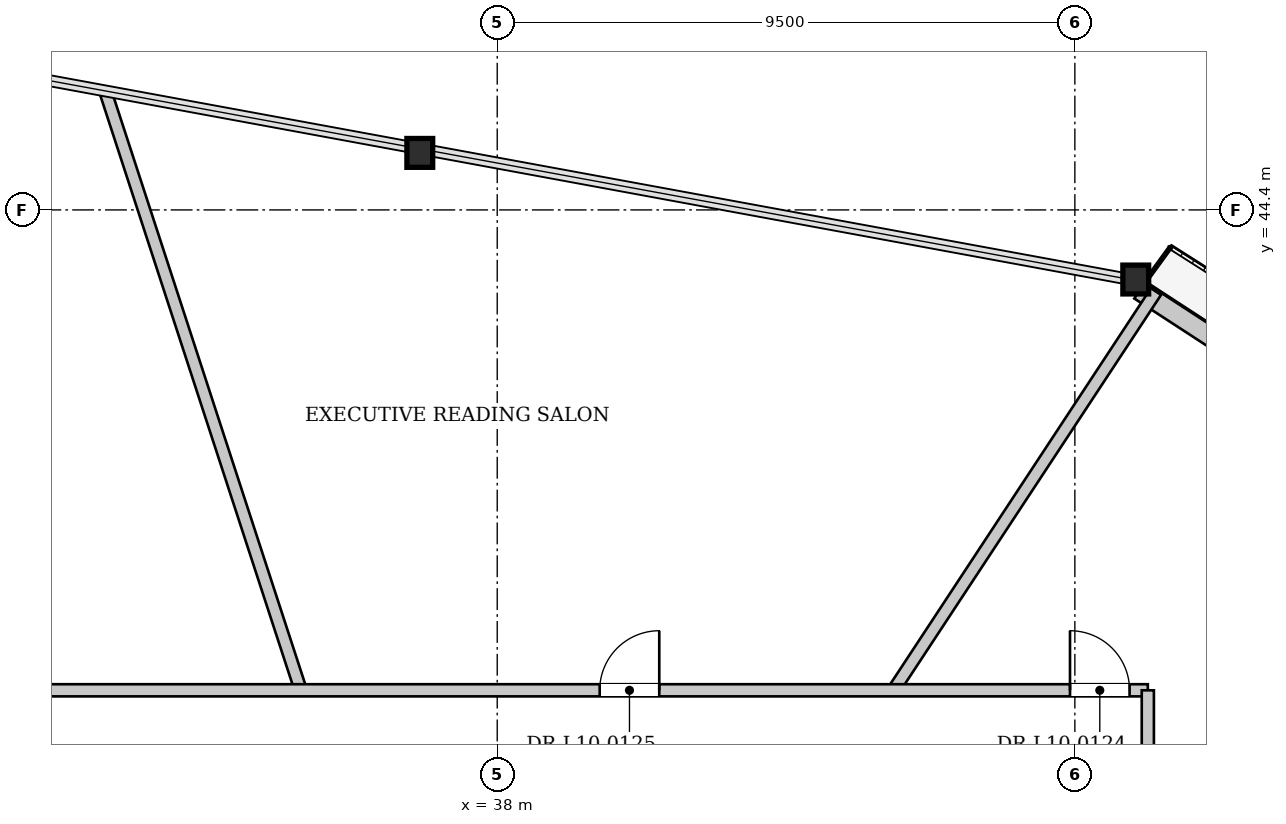
"""IFC4 building model, lengths in metres.
Left out: names, types, materials, properties, quantities, classifications, styles, units other than length and angle.
Written with IfcOpenShell. Run it as: python <this file> out.ifc"""

import sys

from ifc_helpers import new_model, si_unit, direction, frame, frame_2d, origin, origin_2d, place, context, subcontext, project, spatial, rectangle, i_section, extrude, source, transform, mapped, element, fill, save


model = new_model("IFC4")
c1 = context("Model", 3, precision=1e-05, world=origin(), true_north=direction((0.0, 1.0)))
c2 = subcontext(c1, "Body", "Model", "MODEL_VIEW")
j1 = project(units=[si_unit("LENGTHUNIT", "METRE"), si_unit("PLANEANGLEUNIT", "RADIAN")], contexts=[c1])
p1 = place(None, origin())
s1 = spatial("IfcSite", under=j1, at=p1, CompositionType="ELEMENT")
p2 = place(p1, origin())
s2 = spatial("IfcBuilding", under=s1, at=p2, CompositionType="ELEMENT")
p3 = place(p2, frame((0.0, 0.0, 43.5)))
s3 = spatial("IfcBuildingStorey", under=s2, at=p3, CompositionType="ELEMENT", Elevation=43.5)
m1 = source(origin(), c2, "Body", "SweptSolid", [
    extrude(i_section(OverallWidth=0.424, OverallDepth=0.474, WebThickness=0.043, FlangeThickness=0.068, at=origin_2d()), origin(), (0.0, 0.0, 1.0), 3.399),
])
p4 = place(p3, frame((48.652, 43.211, 0.0), z_axis=(-0.088620867342, 0.025925553574, 0.995727978689), x_axis=(-0.280776438027, -0.95977319813, 0.0)))
e1 = element("IfcColumn", 1, at=p4, inside=s3, PredefinedType="COLUMN", context=c2, shape_type="MappedRepresentation", body=[
    mapped(m1, transform((0.0, 0.0, 0.0), x_axis=(1.0, 0.0, 0.0), y_axis=(0.0, 1.0, 0.0), z_axis=(0.0, 0.0, 1.0), scale=1.0)),
])
m2 = source(origin(), c2, "Body", "SweptSolid", [
    extrude(i_section(OverallWidth=0.424, OverallDepth=0.474, WebThickness=0.043, FlangeThickness=0.068, at=origin_2d()), origin(), (0.0, 0.0, 1.0), 3.4),
])
p5 = place(p3, frame((36.884, 45.377, 0.0), z_axis=(-0.092330898884, -0.022903232305, 0.995464940147), x_axis=(0.24075937965, -0.970584834577, 0.0)))
e2 = element("IfcColumn", 2, at=p5, inside=s3, PredefinedType="COLUMN", context=c2, shape_type="MappedRepresentation", body=[
    mapped(m2, transform((0.0, 0.0, 0.0), x_axis=(1.0, 0.0, 0.0), y_axis=(0.0, 1.0, 0.0), z_axis=(0.0, 0.0, 1.0), scale=1.0)),
])
p6 = place(p3, frame((48.565, 43.077, 0.0), z_axis=(0.0, 0.0, 1.0), x_axis=(0.838026180403, -0.545630022048, 0.0)))
e3 = element("IfcWall", 3, at=p6, inside=s3, PredefinedType="SOLIDWALL", context=c2, shape_type="SweptSolid", body=[
    extrude(rectangle(XDim=23.933, YDim=0.32, at=frame_2d((11.966, 0.0))), origin(), (0.0, 0.0, 1.0), 2.592),
])
p7 = place(p6, frame((7.108, 0.0, 0.0)))
e4 = element("IfcOpeningElement", 4, at=p7, cuts=e3, PredefinedType="OPENING", context=c2, shape_type="SweptSolid", body=[
    extrude(rectangle(XDim=1.1, YDim=2.3, at=frame_2d((0.55, 1.15))), frame((0.0, 0.17, 0.0), z_axis=(0.0, -1.0, 0.0), x_axis=(1.0, 0.0, 0.0)), (0.0, 0.0, 1.0), 0.34),
])
p8 = place(p6, frame((16.81, 0.0, 0.272)))
e5 = element("IfcOpeningElement", 5, at=p8, cuts=e3, PredefinedType="OPENING", context=c2, shape_type="SweptSolid", body=[
    extrude(rectangle(XDim=1.8, YDim=2.2, at=frame_2d((0.9, 1.1))), frame((0.0, 0.17, 0.0), z_axis=(0.0, -1.0, 0.0), x_axis=(1.0, 0.0, 0.0)), (0.0, 0.0, 1.0), 0.34),
])
p9 = place(p3, frame((44.517, 36.5, 0.0), z_axis=(0.0, 0.0, 1.0), x_axis=(0.549868353799, 0.835251335521, 0.0)))
e6 = element("IfcWall", 6, at=p9, inside=s3, PredefinedType="PARTITIONING", context=c2, shape_type="SweptSolid", body=[
    extrude(rectangle(XDim=7.851, YDim=0.2, at=frame_2d((3.925, 0.0))), origin(), (0.0, 0.0, 1.0), 3.3),
])
p10 = place(p3, frame((34.77, 36.5, 0.0), z_axis=(0.0, 0.0, 1.0), x_axis=(-0.310204417854, 0.950669879161, 0.0)))
e7 = element("IfcWall", 7, at=p10, inside=s3, PredefinedType="PARTITIONING", context=c2, shape_type="SweptSolid", body=[
    extrude(rectangle(XDim=10.334, YDim=0.2, at=frame_2d((5.167, 0.0))), origin(), (0.0, 0.0, 1.0), 3.3),
])
p11 = place(p3, frame((27.3, 36.5, 0.0), z_axis=(0.0, 0.0, 1.0), x_axis=(1.0, 0.0, 0.0)))
e8 = element("IfcWall", 8, at=p11, inside=s3, PredefinedType="PARTITIONING", context=c2, shape_type="SweptSolid", body=[
    extrude(rectangle(XDim=21.4, YDim=0.2, at=frame_2d((10.7, 0.0))), origin(), (0.0, 0.0, 1.0), 3.3),
])
p12 = place(p11, frame((20.12, 0.0, 0.0)))
e9 = element("IfcOpeningElement", 9, at=p12, cuts=e8, PredefinedType="OPENING", context=c2, shape_type="SweptSolid", body=[
    extrude(rectangle(XDim=0.98, YDim=2.15, at=frame_2d((0.49, 1.075))), frame((0.0, 0.11, 0.0), z_axis=(0.0, -1.0, 0.0), x_axis=(1.0, 0.0, 0.0)), (0.0, 0.0, 1.0), 0.22),
])
p13 = place(p11, frame((12.385, 0.0, 0.0)))
e10 = element("IfcOpeningElement", 10, at=p13, cuts=e8, PredefinedType="OPENING", context=c2, shape_type="SweptSolid", body=[
    extrude(rectangle(XDim=0.98, YDim=2.15, at=frame_2d((0.49, 1.075))), frame((0.0, 0.11, 0.0), z_axis=(0.0, -1.0, 0.0), x_axis=(1.0, 0.0, 0.0)), (0.0, 0.0, 1.0), 0.22),
])
p14 = place(p3, frame((48.7, 16.7, 0.0), z_axis=(0.0, 0.0, 1.0), x_axis=(0.0, 1.0, 0.0)))
e11 = element("IfcWall", 11, at=p14, inside=s3, PredefinedType="PARTITIONING", context=c2, shape_type="SweptSolid", body=[
    extrude(rectangle(XDim=19.8, YDim=0.2, at=frame_2d((9.9, 0.0))), origin(), (0.0, 0.0, 1.0), 3.3),
])
m3 = source(origin(), c2, "Body", "SweptSolid", [
    extrude(rectangle(XDim=0.98, YDim=2.15, at=frame_2d((0.49, 1.075))), frame((0.0, 0.025, 0.0), z_axis=(0.0, -1.0, 0.0), x_axis=(1.0, 0.0, 0.0)), (0.0, 0.0, 1.0), 0.05),
])
p15 = place(p12, origin())
e12 = element("IfcDoor", 12, at=p15, inside=s3, OperationType="SINGLE_SWING_LEFT", PredefinedType="DOOR", context=c2, shape_type="MappedRepresentation", body=[
    mapped(m3, transform((0.0, 0.0, 0.0), x_axis=(1.0, 0.0, 0.0), y_axis=(0.0, 1.0, 0.0), z_axis=(0.0, 0.0, 1.0), scale=1.0)),
])
fill(e9, e12)
p16 = place(p13, origin())
e13 = element("IfcDoor", 13, at=p16, inside=s3, OperationType="SINGLE_SWING_RIGHT", PredefinedType="DOOR", context=c2, shape_type="MappedRepresentation", body=[
    mapped(m3, transform((0.0, 0.0, 0.0), x_axis=(1.0, 0.0, 0.0), y_axis=(0.0, 1.0, 0.0), z_axis=(0.0, 0.0, 1.0), scale=1.0)),
])
fill(e10, e13)
save(model, sys.argv[1])
